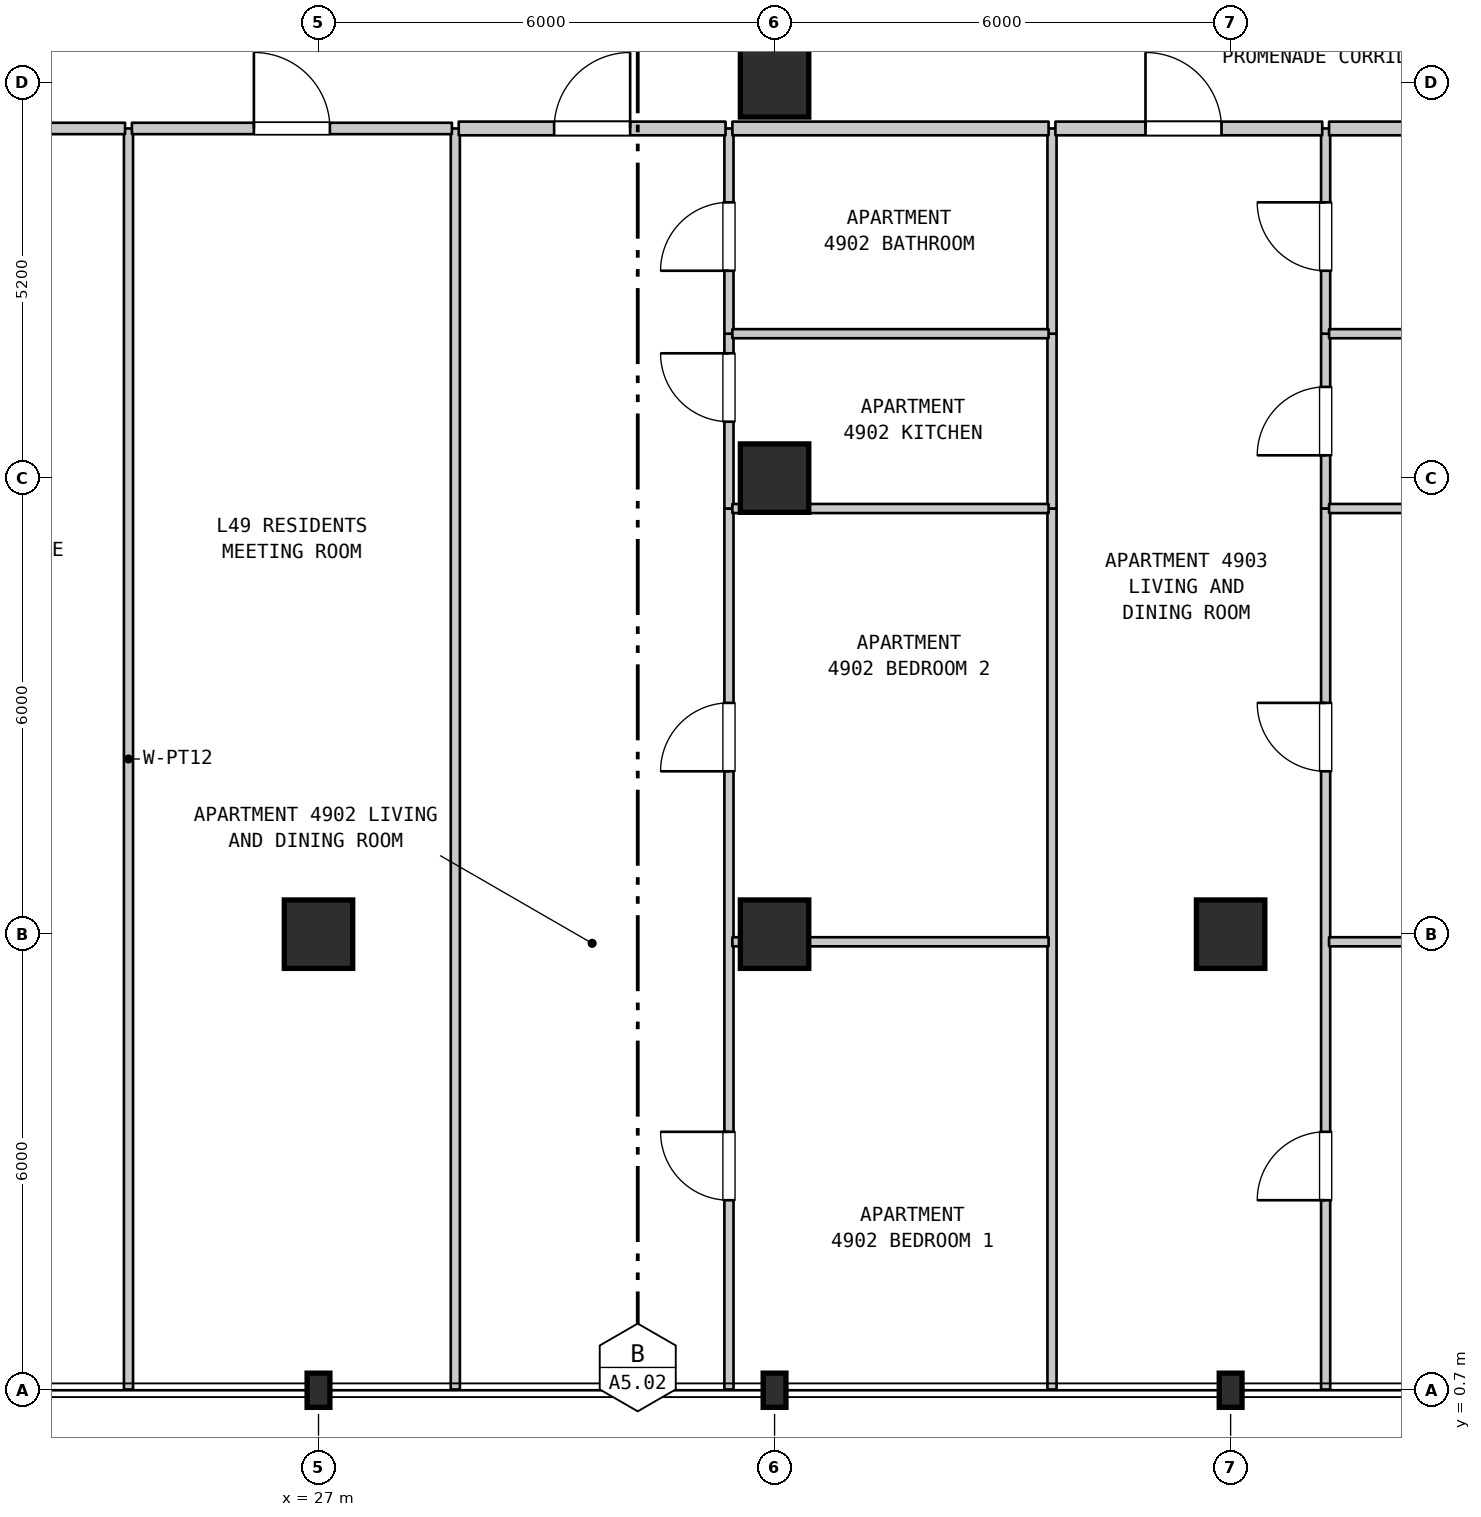
"""IFC4 building model, lengths in metres.
Left out: names, types, materials, properties, quantities, classifications, styles, units other than length and angle.
Written with IfcOpenShell. Run it as: python <this file> out.ifc"""

import sys

from ifc_helpers import new_model, si_unit, direction, frame, frame_2d, origin, origin_2d, place, context, subcontext, project, spatial, rectangle, i_section, extrude, element, fill, save


model = new_model("IFC4")
c1 = context("Model", 3, precision=1e-05, world=origin(), true_north=direction((0.0, 1.0)))
c2 = subcontext(c1, "Body", "Model", "MODEL_VIEW")
j1 = project(units=[si_unit("LENGTHUNIT", "METRE"), si_unit("PLANEANGLEUNIT", "RADIAN")], contexts=[c1])
p1 = place(None, origin())
s1 = spatial("IfcSite", under=j1, at=p1, CompositionType="ELEMENT")
p2 = place(p1, origin())
s2 = spatial("IfcBuilding", under=s1, at=p2, CompositionType="ELEMENT")
p3 = place(p2, frame((0.0, 0.0, 199.5)))
s3 = spatial("IfcBuildingStorey", under=s2, at=p3, CompositionType="ELEMENT", Elevation=199.5)
p4 = place(p3, frame((27.0, 0.7, 0.0), z_axis=(0.0, 0.0, 1.0), x_axis=(1.0, 0.0, 0.0)))
e1 = element("IfcColumn", 1, at=p4, inside=s3, PredefinedType="COLUMN", context=c2, shape_type="SweptSolid", body=[
    extrude(i_section(OverallWidth=0.3, OverallDepth=0.45, WebThickness=0.014, FlangeThickness=0.026, FilletRadius=0.027, at=origin_2d()), origin(), (0.0, 0.0, 1.0), 3.7),
])
p5 = place(p3, frame((27.0, 6.7, 0.0), z_axis=(0.0, 0.0, 1.0), x_axis=(1.0, 0.0, 0.0)))
e2 = element("IfcColumn", 2, at=p5, inside=s3, PredefinedType="COLUMN", context=c2, shape_type="SweptSolid", body=[
    extrude(rectangle(XDim=0.9, YDim=0.9, at=origin_2d()), origin(), (0.0, 0.0, 1.0), 3.7),
])
p6 = place(p3, frame((33.0, 0.7, 0.0), z_axis=(0.0, 0.0, 1.0), x_axis=(1.0, 0.0, 0.0)))
e3 = element("IfcColumn", 3, at=p6, inside=s3, PredefinedType="COLUMN", context=c2, shape_type="SweptSolid", body=[
    extrude(i_section(OverallWidth=0.3, OverallDepth=0.45, WebThickness=0.014, FlangeThickness=0.026, FilletRadius=0.027, at=origin_2d()), origin(), (0.0, 0.0, 1.0), 3.7),
])
for number, where, z_axis, x_axis in (
    (4, (33.0, 6.7, 0.0), (0.0, 0.0, 1.0), (1.0, 0.0, 0.0)),
    (5, (33.0, 12.7, 0.0), (0.0, 0.0, 1.0), (1.0, 0.0, 0.0)),
    (6, (33.0, 17.9, 0.0), (0.0, 0.0, 1.0), (1.0, 0.0, 0.0)),
):
    element("IfcColumn", number, at=place(p3, frame(where, z_axis=z_axis, x_axis=x_axis)), inside=s3, PredefinedType="COLUMN", context=c2, shape_type="SweptSolid", body=[
        extrude(rectangle(XDim=0.9, YDim=0.9, at=origin_2d()), origin(), (0.0, 0.0, 1.0), 3.7),
    ])
p7 = place(p3, frame((39.0, 0.7, 0.0), z_axis=(0.0, 0.0, 1.0), x_axis=(1.0, 0.0, 0.0)))
e7 = element("IfcColumn", 7, at=p7, inside=s3, PredefinedType="COLUMN", context=c2, shape_type="SweptSolid", body=[
    extrude(i_section(OverallWidth=0.3, OverallDepth=0.45, WebThickness=0.014, FlangeThickness=0.026, FilletRadius=0.027, at=origin_2d()), origin(), (0.0, 0.0, 1.0), 3.7),
])
p8 = place(p3, frame((39.0, 6.7, 0.0), z_axis=(0.0, 0.0, 1.0), x_axis=(1.0, 0.0, 0.0)))
e8 = element("IfcColumn", 8, at=p8, inside=s3, PredefinedType="COLUMN", context=c2, shape_type="SweptSolid", body=[
    extrude(rectangle(XDim=0.9, YDim=0.9, at=origin_2d()), origin(), (0.0, 0.0, 1.0), 3.7),
])
for number, where, z_axis, x_axis in (
    (9, (24.5, 0.71, 0.0), (0.0, 0.0, 1.0), (0.0, 1.0, 0.0)),
    (10, (28.8, 0.71, 0.0), (0.0, 0.0, 1.0), (0.0, 1.0, 0.0)),
):
    element("IfcWall", number, at=place(p3, frame(where, z_axis=z_axis, x_axis=x_axis)), inside=s3, PredefinedType="PARTITIONING", context=c2, shape_type="SweptSolid", body=[
        extrude(rectangle(XDim=16.59, YDim=0.12, at=frame_2d((8.295, 0.0))), origin(), (0.0, 0.0, 1.0), 3.39),
    ])
p9 = place(p3, frame((32.4, 0.71, 0.0), z_axis=(0.0, 0.0, 1.0), x_axis=(0.0, 1.0, 0.0)))
e11 = element("IfcWall", 11, at=p9, inside=s3, PredefinedType="PARTITIONING", context=c2, shape_type="SweptSolid", body=[
    extrude(rectangle(XDim=11.59, YDim=0.12, at=frame_2d((5.795, 0.0))), origin(), (0.0, 0.0, 1.0), 3.39),
])
p10 = place(p9, frame((2.49, 0.0, 0.0)))
e12 = element("IfcOpeningElement", 12, at=p10, cuts=e11, PredefinedType="OPENING", context=c2, shape_type="SweptSolid", body=[
    extrude(rectangle(XDim=0.9, YDim=2.15, at=frame_2d((0.45, 1.075))), frame((0.0, 0.07, 0.0), z_axis=(0.0, -1.0, 0.0), x_axis=(1.0, 0.0, 0.0)), (0.0, 0.0, 1.0), 0.14),
])
p11 = place(p9, frame((8.133, 0.0, 0.0)))
e13 = element("IfcOpeningElement", 13, at=p11, cuts=e11, PredefinedType="OPENING", context=c2, shape_type="SweptSolid", body=[
    extrude(rectangle(XDim=0.9, YDim=2.15, at=frame_2d((0.45, 1.075))), frame((0.0, 0.07, 0.0), z_axis=(0.0, -1.0, 0.0), x_axis=(1.0, 0.0, 0.0)), (0.0, 0.0, 1.0), 0.14),
])
p12 = place(p3, frame((32.4, 12.3, 0.0), z_axis=(0.0, 0.0, 1.0), x_axis=(0.0, 1.0, 0.0)))
e14 = element("IfcWall", 14, at=p12, inside=s3, PredefinedType="PARTITIONING", context=c2, shape_type="SweptSolid", body=[
    extrude(rectangle(XDim=2.3, YDim=0.12, at=frame_2d((1.15, 0.0))), origin(), (0.0, 0.0, 1.0), 3.39),
])
p13 = place(p12, frame((1.142, 0.0, 0.0)))
e15 = element("IfcOpeningElement", 15, at=p13, cuts=e14, PredefinedType="OPENING", context=c2, shape_type="SweptSolid", body=[
    extrude(rectangle(XDim=0.9, YDim=2.15, at=frame_2d((0.45, 1.075))), frame((0.0, 0.07, 0.0), z_axis=(0.0, -1.0, 0.0), x_axis=(1.0, 0.0, 0.0)), (0.0, 0.0, 1.0), 0.14),
])
p14 = place(p3, frame((32.4, 14.6, 0.0), z_axis=(0.0, 0.0, 1.0), x_axis=(0.0, 1.0, 0.0)))
e16 = element("IfcWall", 16, at=p14, inside=s3, PredefinedType="PARTITIONING", context=c2, shape_type="SweptSolid", body=[
    extrude(rectangle(XDim=2.7, YDim=0.12, at=frame_2d((1.35, 0.0))), origin(), (0.0, 0.0, 1.0), 3.39),
])
p15 = place(p14, frame((0.828, 0.0, 0.0)))
e17 = element("IfcOpeningElement", 17, at=p15, cuts=e16, PredefinedType="OPENING", context=c2, shape_type="SweptSolid", body=[
    extrude(rectangle(XDim=0.9, YDim=2.1, at=frame_2d((0.45, 1.05))), frame((0.0, 0.07, 0.0), z_axis=(0.0, -1.0, 0.0), x_axis=(1.0, 0.0, 0.0)), (0.0, 0.0, 1.0), 0.14),
])
p16 = place(p3, frame((36.65, 0.71, 0.0), z_axis=(0.0, 0.0, 1.0), x_axis=(0.0, 1.0, 0.0)))
e18 = element("IfcWall", 18, at=p16, inside=s3, PredefinedType="PARTITIONING", context=c2, shape_type="SweptSolid", body=[
    extrude(rectangle(XDim=11.59, YDim=0.12, at=frame_2d((5.795, 0.0))), origin(), (0.0, 0.0, 1.0), 3.39),
])
p17 = place(p3, frame((36.65, 12.3, 0.0), z_axis=(0.0, 0.0, 1.0), x_axis=(0.0, 1.0, 0.0)))
e19 = element("IfcWall", 19, at=p17, inside=s3, PredefinedType="PARTITIONING", context=c2, shape_type="SweptSolid", body=[
    extrude(rectangle(XDim=2.3, YDim=0.12, at=frame_2d((1.15, 0.0))), origin(), (0.0, 0.0, 1.0), 3.39),
])
p18 = place(p3, frame((36.65, 14.6, 0.0), z_axis=(0.0, 0.0, 1.0), x_axis=(0.0, 1.0, 0.0)))
e20 = element("IfcWall", 20, at=p18, inside=s3, PredefinedType="PARTITIONING", context=c2, shape_type="SweptSolid", body=[
    extrude(rectangle(XDim=2.7, YDim=0.12, at=frame_2d((1.35, 0.0))), origin(), (0.0, 0.0, 1.0), 3.39),
])
p19 = place(p3, frame((40.25, 0.71, 0.0), z_axis=(0.0, 0.0, 1.0), x_axis=(0.0, 1.0, 0.0)))
e21 = element("IfcWall", 21, at=p19, inside=s3, PredefinedType="PARTITIONING", context=c2, shape_type="SweptSolid", body=[
    extrude(rectangle(XDim=11.59, YDim=0.12, at=frame_2d((5.795, 0.0))), origin(), (0.0, 0.0, 1.0), 3.39),
])
p20 = place(p19, frame((2.49, 0.0, 0.0)))
e22 = element("IfcOpeningElement", 22, at=p20, cuts=e21, PredefinedType="OPENING", context=c2, shape_type="SweptSolid", body=[
    extrude(rectangle(XDim=0.9, YDim=2.15, at=frame_2d((0.45, 1.075))), frame((0.0, 0.07, 0.0), z_axis=(0.0, -1.0, 0.0), x_axis=(1.0, 0.0, 0.0)), (0.0, 0.0, 1.0), 0.14),
])
p21 = place(p19, frame((8.133, 0.0, 0.0)))
e23 = element("IfcOpeningElement", 23, at=p21, cuts=e21, PredefinedType="OPENING", context=c2, shape_type="SweptSolid", body=[
    extrude(rectangle(XDim=0.9, YDim=2.15, at=frame_2d((0.45, 1.075))), frame((0.0, 0.07, 0.0), z_axis=(0.0, -1.0, 0.0), x_axis=(1.0, 0.0, 0.0)), (0.0, 0.0, 1.0), 0.14),
])
p22 = place(p3, frame((40.25, 12.3, 0.0), z_axis=(0.0, 0.0, 1.0), x_axis=(0.0, 1.0, 0.0)))
e24 = element("IfcWall", 24, at=p22, inside=s3, PredefinedType="PARTITIONING", context=c2, shape_type="SweptSolid", body=[
    extrude(rectangle(XDim=2.3, YDim=0.12, at=frame_2d((1.15, 0.0))), origin(), (0.0, 0.0, 1.0), 3.39),
])
p23 = place(p22, frame((0.7, 0.0, 0.0)))
e25 = element("IfcOpeningElement", 25, at=p23, cuts=e24, PredefinedType="OPENING", context=c2, shape_type="SweptSolid", body=[
    extrude(rectangle(XDim=0.9, YDim=2.15, at=frame_2d((0.45, 1.075))), frame((0.0, 0.07, 0.0), z_axis=(0.0, -1.0, 0.0), x_axis=(1.0, 0.0, 0.0)), (0.0, 0.0, 1.0), 0.14),
])
p24 = place(p3, frame((40.25, 14.6, 0.0), z_axis=(0.0, 0.0, 1.0), x_axis=(0.0, 1.0, 0.0)))
e26 = element("IfcWall", 26, at=p24, inside=s3, PredefinedType="PARTITIONING", context=c2, shape_type="SweptSolid", body=[
    extrude(rectangle(XDim=2.7, YDim=0.12, at=frame_2d((1.35, 0.0))), origin(), (0.0, 0.0, 1.0), 3.39),
])
p25 = place(p24, frame((0.828, 0.0, 0.0)))
e27 = element("IfcOpeningElement", 27, at=p25, cuts=e26, PredefinedType="OPENING", context=c2, shape_type="SweptSolid", body=[
    extrude(rectangle(XDim=0.9, YDim=2.1, at=frame_2d((0.45, 1.05))), frame((0.0, 0.07, 0.0), z_axis=(0.0, -1.0, 0.0), x_axis=(1.0, 0.0, 0.0)), (0.0, 0.0, 1.0), 0.14),
])
p26 = place(p3, frame((32.445, 6.6, 0.0), z_axis=(0.0, 0.0, 1.0), x_axis=(1.0, 0.0, 0.0)))
e28 = element("IfcWall", 28, at=p26, inside=s3, PredefinedType="PARTITIONING", context=c2, shape_type="SweptSolid", body=[
    extrude(rectangle(XDim=4.16, YDim=0.12, at=frame_2d((2.08, 0.0))), origin(), (0.0, 0.0, 1.0), 3.09),
])
p27 = place(p3, frame((40.295, 6.6, 0.0), z_axis=(0.0, 0.0, 1.0), x_axis=(1.0, 0.0, 0.0)))
e29 = element("IfcWall", 29, at=p27, inside=s3, PredefinedType="PARTITIONING", context=c2, shape_type="SweptSolid", body=[
    extrude(rectangle(XDim=4.16, YDim=0.12, at=frame_2d((2.08, 0.0))), origin(), (0.0, 0.0, 1.0), 2.79),
])
p28 = place(p3, frame((32.445, 12.3, 0.0), z_axis=(0.0, 0.0, 1.0), x_axis=(1.0, 0.0, 0.0)))
e30 = element("IfcWall", 30, at=p28, inside=s3, PredefinedType="PARTITIONING", context=c2, shape_type="SweptSolid", body=[
    extrude(rectangle(XDim=4.16, YDim=0.12, at=frame_2d((2.08, 0.0))), origin(), (0.0, 0.0, 1.0), 3.39),
])
p29 = place(p3, frame((40.295, 12.3, 0.0), z_axis=(0.0, 0.0, 1.0), x_axis=(1.0, 0.0, 0.0)))
e31 = element("IfcWall", 31, at=p29, inside=s3, PredefinedType="PARTITIONING", context=c2, shape_type="SweptSolid", body=[
    extrude(rectangle(XDim=4.16, YDim=0.12, at=frame_2d((2.08, 0.0))), origin(), (0.0, 0.0, 1.0), 3.39),
])
p30 = place(p3, frame((32.445, 14.6, 0.0), z_axis=(0.0, 0.0, 1.0), x_axis=(1.0, 0.0, 0.0)))
e32 = element("IfcWall", 32, at=p30, inside=s3, PredefinedType="PARTITIONING", context=c2, shape_type="SweptSolid", body=[
    extrude(rectangle(XDim=4.16, YDim=0.12, at=frame_2d((2.08, 0.0))), origin(), (0.0, 0.0, 1.0), 3.39),
])
p31 = place(p3, frame((40.295, 14.6, 0.0), z_axis=(0.0, 0.0, 1.0), x_axis=(1.0, 0.0, 0.0)))
e33 = element("IfcWall", 33, at=p31, inside=s3, PredefinedType="PARTITIONING", context=c2, shape_type="SweptSolid", body=[
    extrude(rectangle(XDim=4.16, YDim=0.12, at=frame_2d((2.08, 0.0))), origin(), (0.0, 0.0, 1.0), 3.39),
])
p32 = place(p3, frame((20.545, 17.3, 0.0), z_axis=(0.0, 0.0, 1.0), x_axis=(1.0, 0.0, 0.0)))
e34 = element("IfcWall", 34, at=p32, inside=s3, PredefinedType="STANDARD", context=c2, shape_type="SweptSolid", body=[
    extrude(rectangle(XDim=3.91, YDim=0.15, at=frame_2d((1.955, 0.0))), origin(), (0.0, 0.0, 1.0), 3.39),
])
p33 = place(p32, frame((1.455, 0.0, 0.0)))
e35 = element("IfcOpeningElement", 35, at=p33, cuts=e34, PredefinedType="OPENING", context=c2, shape_type="SweptSolid", body=[
    extrude(rectangle(XDim=1.0, YDim=2.15, at=frame_2d((0.5, 1.075))), frame((0.0, 0.085, 0.0), z_axis=(0.0, -1.0, 0.0), x_axis=(1.0, 0.0, 0.0)), (0.0, 0.0, 1.0), 0.17),
])
p34 = place(p3, frame((24.545, 17.3, 0.0), z_axis=(0.0, 0.0, 1.0), x_axis=(1.0, 0.0, 0.0)))
e36 = element("IfcWall", 36, at=p34, inside=s3, PredefinedType="STANDARD", context=c2, shape_type="SweptSolid", body=[
    extrude(rectangle(XDim=4.21, YDim=0.15, at=frame_2d((2.105, 0.0))), origin(), (0.0, 0.0, 1.0), 3.39),
])
p35 = place(p34, frame((1.605, 0.0, 0.0)))
e37 = element("IfcOpeningElement", 37, at=p35, cuts=e36, PredefinedType="OPENING", context=c2, shape_type="SweptSolid", body=[
    extrude(rectangle(XDim=1.0, YDim=2.15, at=frame_2d((0.5, 1.075))), frame((0.0, 0.085, 0.0), z_axis=(0.0, -1.0, 0.0), x_axis=(1.0, 0.0, 0.0)), (0.0, 0.0, 1.0), 0.17),
])
p36 = place(p3, frame((28.845, 17.3, 0.0), z_axis=(0.0, 0.0, 1.0), x_axis=(1.0, 0.0, 0.0)))
e38 = element("IfcWall", 38, at=p36, inside=s3, PredefinedType="STANDARD", context=c2, shape_type="SweptSolid", body=[
    extrude(rectangle(XDim=3.51, YDim=0.18, at=frame_2d((1.755, 0.0))), origin(), (0.0, 0.0, 1.0), 3.39),
])
p37 = place(p36, frame((1.255, 0.0, 0.0)))
e39 = element("IfcOpeningElement", 39, at=p37, cuts=e38, PredefinedType="OPENING", context=c2, shape_type="SweptSolid", body=[
    extrude(rectangle(XDim=1.0, YDim=2.15, at=frame_2d((0.5, 1.075))), frame((0.0, 0.1, 0.0), z_axis=(0.0, -1.0, 0.0), x_axis=(1.0, 0.0, 0.0)), (0.0, 0.0, 1.0), 0.2),
])
p38 = place(p3, frame((32.445, 17.3, 0.0), z_axis=(0.0, 0.0, 1.0), x_axis=(1.0, 0.0, 0.0)))
e40 = element("IfcWall", 40, at=p38, inside=s3, PredefinedType="STANDARD", context=c2, shape_type="SweptSolid", body=[
    extrude(rectangle(XDim=4.16, YDim=0.18, at=frame_2d((2.08, 0.0))), origin(), (0.0, 0.0, 1.0), 3.39),
])
p39 = place(p3, frame((36.695, 17.3, 0.0), z_axis=(0.0, 0.0, 1.0), x_axis=(1.0, 0.0, 0.0)))
e41 = element("IfcWall", 41, at=p39, inside=s3, PredefinedType="STANDARD", context=c2, shape_type="SweptSolid", body=[
    extrude(rectangle(XDim=3.51, YDim=0.18, at=frame_2d((1.755, 0.0))), origin(), (0.0, 0.0, 1.0), 3.39),
])
p40 = place(p39, frame((1.185, 0.0, 0.0)))
e42 = element("IfcOpeningElement", 42, at=p40, cuts=e41, PredefinedType="OPENING", context=c2, shape_type="SweptSolid", body=[
    extrude(rectangle(XDim=1.0, YDim=2.15, at=frame_2d((0.5, 1.075))), frame((0.0, 0.1, 0.0), z_axis=(0.0, -1.0, 0.0), x_axis=(1.0, 0.0, 0.0)), (0.0, 0.0, 1.0), 0.2),
])
p41 = place(p3, frame((40.295, 17.3, 0.0), z_axis=(0.0, 0.0, 1.0), x_axis=(1.0, 0.0, 0.0)))
e43 = element("IfcWall", 43, at=p41, inside=s3, PredefinedType="STANDARD", context=c2, shape_type="SweptSolid", body=[
    extrude(rectangle(XDim=4.16, YDim=0.18, at=frame_2d((2.08, 0.0))), origin(), (0.0, 0.0, 1.0), 3.39),
])
p42 = place(p10, origin())
e44 = element("IfcDoor", 44, at=p42, inside=s3, OperationType="SINGLE_SWING_RIGHT", PredefinedType="DOOR", context=c2, shape_type="SweptSolid", body=[
    extrude(rectangle(XDim=0.9, YDim=2.15, at=frame_2d((0.45, 1.075))), frame((0.0, 0.025, 0.0), z_axis=(0.0, -1.0, 0.0), x_axis=(1.0, 0.0, 0.0)), (0.0, 0.0, 1.0), 0.05),
])
fill(e12, e44)
p43 = place(p11, origin())
e45 = element("IfcDoor", 45, at=p43, inside=s3, OperationType="SINGLE_SWING_LEFT", PredefinedType="DOOR", context=c2, shape_type="SweptSolid", body=[
    extrude(rectangle(XDim=0.9, YDim=2.15, at=frame_2d((0.45, 1.075))), frame((0.0, 0.025, 0.0), z_axis=(0.0, -1.0, 0.0), x_axis=(1.0, 0.0, 0.0)), (0.0, 0.0, 1.0), 0.05),
])
fill(e13, e45)
p44 = place(p13, origin())
e46 = element("IfcDoor", 46, at=p44, inside=s3, OperationType="SINGLE_SWING_RIGHT", PredefinedType="DOOR", context=c2, shape_type="SweptSolid", body=[
    extrude(rectangle(XDim=0.9, YDim=2.15, at=frame_2d((0.45, 1.075))), frame((0.0, 0.025, 0.0), z_axis=(0.0, -1.0, 0.0), x_axis=(1.0, 0.0, 0.0)), (0.0, 0.0, 1.0), 0.05),
])
fill(e15, e46)
p45 = place(p15, origin())
e47 = element("IfcDoor", 47, at=p45, inside=s3, OperationType="SINGLE_SWING_LEFT", PredefinedType="DOOR", context=c2, shape_type="SweptSolid", body=[
    extrude(rectangle(XDim=0.9, YDim=2.1, at=frame_2d((0.45, 1.05))), frame((0.0, 0.025, 0.0), z_axis=(0.0, -1.0, 0.0), x_axis=(1.0, 0.0, 0.0)), (0.0, 0.0, 1.0), 0.05),
])
fill(e17, e47)
p46 = place(p20, origin())
e48 = element("IfcDoor", 48, at=p46, inside=s3, OperationType="SINGLE_SWING_LEFT", PredefinedType="DOOR", context=c2, shape_type="SweptSolid", body=[
    extrude(rectangle(XDim=0.9, YDim=2.15, at=frame_2d((0.45, 1.075))), frame((0.0, 0.025, 0.0), z_axis=(0.0, -1.0, 0.0), x_axis=(1.0, 0.0, 0.0)), (0.0, 0.0, 1.0), 0.05),
])
fill(e22, e48)
p47 = place(p21, origin())
e49 = element("IfcDoor", 49, at=p47, inside=s3, OperationType="SINGLE_SWING_RIGHT", PredefinedType="DOOR", context=c2, shape_type="SweptSolid", body=[
    extrude(rectangle(XDim=0.9, YDim=2.15, at=frame_2d((0.45, 1.075))), frame((0.0, 0.025, 0.0), z_axis=(0.0, -1.0, 0.0), x_axis=(1.0, 0.0, 0.0)), (0.0, 0.0, 1.0), 0.05),
])
fill(e23, e49)
p48 = place(p23, origin())
e50 = element("IfcDoor", 50, at=p48, inside=s3, OperationType="SINGLE_SWING_LEFT", PredefinedType="DOOR", context=c2, shape_type="SweptSolid", body=[
    extrude(rectangle(XDim=0.9, YDim=2.15, at=frame_2d((0.45, 1.075))), frame((0.0, 0.025, 0.0), z_axis=(0.0, -1.0, 0.0), x_axis=(1.0, 0.0, 0.0)), (0.0, 0.0, 1.0), 0.05),
])
fill(e25, e50)
p49 = place(p25, origin())
e51 = element("IfcDoor", 51, at=p49, inside=s3, OperationType="SINGLE_SWING_RIGHT", PredefinedType="DOOR", context=c2, shape_type="SweptSolid", body=[
    extrude(rectangle(XDim=0.9, YDim=2.1, at=frame_2d((0.45, 1.05))), frame((0.0, 0.025, 0.0), z_axis=(0.0, -1.0, 0.0), x_axis=(1.0, 0.0, 0.0)), (0.0, 0.0, 1.0), 0.05),
])
fill(e27, e51)
p50 = place(p35, origin())
e52 = element("IfcDoor", 52, at=p50, inside=s3, OperationType="SINGLE_SWING_LEFT", PredefinedType="DOOR", context=c2, shape_type="SweptSolid", body=[
    extrude(rectangle(XDim=1.0, YDim=2.15, at=frame_2d((0.5, 1.075))), frame((0.0, 0.025, 0.0), z_axis=(0.0, -1.0, 0.0), x_axis=(1.0, 0.0, 0.0)), (0.0, 0.0, 1.0), 0.05),
])
fill(e37, e52)
p51 = place(p37, origin())
e53 = element("IfcDoor", 53, at=p51, inside=s3, OperationType="SINGLE_SWING_RIGHT", PredefinedType="DOOR", context=c2, shape_type="SweptSolid", body=[
    extrude(rectangle(XDim=1.0, YDim=2.15, at=frame_2d((0.5, 1.075))), frame((0.0, 0.025, 0.0), z_axis=(0.0, -1.0, 0.0), x_axis=(1.0, 0.0, 0.0)), (0.0, 0.0, 1.0), 0.05),
])
fill(e39, e53)
p52 = place(p40, origin())
e54 = element("IfcDoor", 54, at=p52, inside=s3, OperationType="SINGLE_SWING_LEFT", PredefinedType="DOOR", context=c2, shape_type="SweptSolid", body=[
    extrude(rectangle(XDim=1.0, YDim=2.15, at=frame_2d((0.5, 1.075))), frame((0.0, 0.025, 0.0), z_axis=(0.0, -1.0, 0.0), x_axis=(1.0, 0.0, 0.0)), (0.0, 0.0, 1.0), 0.05),
])
fill(e42, e54)
save(model, sys.argv[1])
